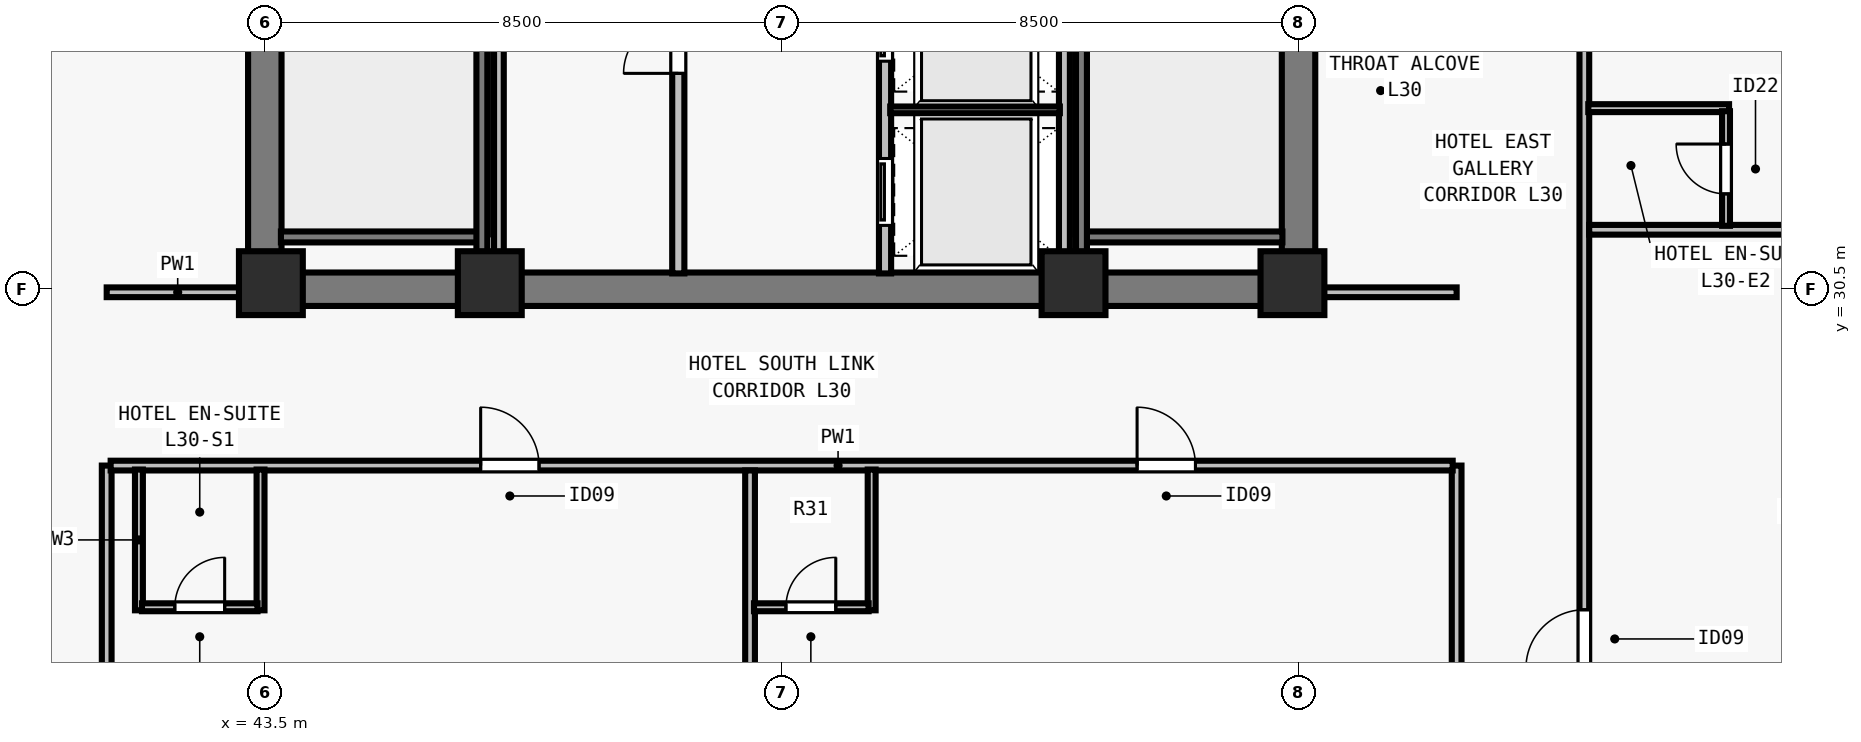
"""IFC4 building model, lengths in metres.
Left out: names, types, materials, properties, quantities, classifications, styles, units other than length and angle.
Written with IfcOpenShell. Run it as: python <this file> out.ifc"""

import sys

from ifc_helpers import new_model, si_unit, direction, frame, frame_2d, origin, origin_2d, place, context, subcontext, project, spatial, rectangle, extrude, element, fill, save


model = new_model("IFC4")
c1 = context("Model", 3, precision=1e-05, world=origin(), true_north=direction((0.0, 1.0)))
c2 = subcontext(c1, "Body", "Model", "MODEL_VIEW")
j1 = project(units=[si_unit("LENGTHUNIT", "METRE"), si_unit("PLANEANGLEUNIT", "RADIAN")], contexts=[c1])
p1 = place(None, origin())
s1 = spatial("IfcSite", under=j1, at=p1, CompositionType="ELEMENT")
p2 = place(p1, origin())
s2 = spatial("IfcBuilding", under=s1, at=p2, CompositionType="ELEMENT")
p3 = place(p2, frame((0.0, 0.0, 113.0)))
s3 = spatial("IfcBuildingStorey", under=s2, at=p3, CompositionType="ELEMENT", Elevation=113.0)
for number, where, z_axis, x_axis in (
    (1, (43.6, 30.6, 0.0), (0.0, 0.0, 1.0), (1.0, 0.0, 0.0)),
    (2, (47.2, 30.6, 0.0), (0.0, 0.0, 1.0), (1.0, 0.0, 0.0)),
    (3, (56.8, 30.6, 0.0), (0.0, 0.0, 1.0), (1.0, 0.0, 0.0)),
    (4, (60.4, 30.6, 0.0), (0.0, 0.0, 1.0), (1.0, 0.0, 0.0)),
):
    element("IfcColumn", number, at=place(p3, frame(where, z_axis=z_axis, x_axis=x_axis)), inside=s3, PredefinedType="COLUMN", context=c2, shape_type="SweptSolid", body=[
        extrude(rectangle(XDim=1.05, YDim=1.05, at=origin_2d()), origin(), (0.0, 0.0, 1.0), 3.5),
    ])
p4 = place(p3, frame((43.225, 30.5, 0.0), z_axis=(0.0, 0.0, 1.0), x_axis=(1.0, 0.0, 0.0)))
e5 = element("IfcWall", 5, at=p4, inside=s3, PredefinedType="SHEAR", context=c2, shape_type="SweptSolid", body=[
    extrude(rectangle(XDim=17.55, YDim=0.55, at=frame_2d((8.775, 0.0))), origin(), (0.0, 0.0, 1.0), 3.28),
])
for number, where, z_axis, x_axis in (
    (6, (43.5, 30.765, 0.0), (0.0, 0.0, 1.0), (0.0, 1.0, 0.0)),
    (7, (60.5, 30.765, 0.0), (0.0, 0.0, 1.0), (0.0, 1.0, 0.0)),
):
    element("IfcWall", number, at=place(p3, frame(where, z_axis=z_axis, x_axis=x_axis)), inside=s3, PredefinedType="SHEAR", context=c2, shape_type="SweptSolid", body=[
        extrude(rectangle(XDim=7.985, YDim=0.55, at=frame_2d((3.993, 0.0))), origin(), (0.0, 0.0, 1.0), 3.28),
    ])
p5 = place(p3, frame((50.3, 30.76, 0.0), z_axis=(0.0, 0.0, 1.0), x_axis=(0.0, 1.0, 0.0)))
e8 = element("IfcWall", 8, at=p5, inside=s3, PredefinedType="SOLIDWALL", context=c2, shape_type="SweptSolid", body=[
    extrude(rectangle(XDim=7.855, YDim=0.2, at=frame_2d((3.927, 0.0))), origin(), (0.0, 0.0, 1.0), 3.28),
])
p6 = place(p5, frame((3.29, 0.0, 0.0)))
e9 = element("IfcOpeningElement", 9, at=p6, cuts=e8, PredefinedType="OPENING", context=c2, shape_type="SweptSolid", body=[
    extrude(rectangle(XDim=0.9, YDim=2.12, at=frame_2d((0.45, 1.06))), frame((0.0, 0.11, 0.0), z_axis=(0.0, -1.0, 0.0), x_axis=(1.0, 0.0, 0.0)), (0.0, 0.0, 1.0), 0.22),
])
p7 = place(p3, frame((53.7, 30.76, 0.0), z_axis=(0.0, 0.0, 1.0), x_axis=(0.0, 1.0, 0.0)))
e10 = element("IfcWall", 10, at=p7, inside=s3, PredefinedType="SOLIDWALL", context=c2, shape_type="SweptSolid", body=[
    extrude(rectangle(XDim=7.855, YDim=0.2, at=frame_2d((3.927, 0.0))), origin(), (0.0, 0.0, 1.0), 3.28),
])
p8 = place(p7, frame((0.79, 0.0, 0.0)))
e11 = element("IfcOpeningElement", 11, at=p8, cuts=e10, PredefinedType="OPENING", context=c2, shape_type="SweptSolid", body=[
    extrude(rectangle(XDim=1.1, YDim=2.2, at=frame_2d((0.55, 1.1))), frame((0.0, 0.11, 0.0), z_axis=(0.0, -1.0, 0.0), x_axis=(1.0, 0.0, 0.0)), (0.0, 0.0, 1.0), 0.22),
])
p9 = place(p7, frame((3.49, 0.0, 0.0)))
e12 = element("IfcOpeningElement", 12, at=p9, cuts=e10, PredefinedType="OPENING", context=c2, shape_type="SweptSolid", body=[
    extrude(rectangle(XDim=1.1, YDim=2.2, at=frame_2d((0.55, 1.1))), frame((0.0, 0.11, 0.0), z_axis=(0.0, -1.0, 0.0), x_axis=(1.0, 0.0, 0.0)), (0.0, 0.0, 1.0), 0.22),
])
p10 = place(p7, frame((6.19, 0.0, 0.0)))
e13 = element("IfcOpeningElement", 13, at=p10, cuts=e10, PredefinedType="OPENING", context=c2, shape_type="SweptSolid", body=[
    extrude(rectangle(XDim=1.1, YDim=2.2, at=frame_2d((0.55, 1.1))), frame((0.0, 0.11, 0.0), z_axis=(0.0, -1.0, 0.0), x_axis=(1.0, 0.0, 0.0)), (0.0, 0.0, 1.0), 0.22),
])
p11 = place(p3, frame((47.35, 30.76, 0.0), z_axis=(0.0, 0.0, 1.0), x_axis=(0.0, 1.0, 0.0)))
e14 = element("IfcWall", 14, at=p11, inside=s3, PredefinedType="PARTITIONING", context=c2, shape_type="SweptSolid", body=[
    extrude(rectangle(XDim=7.855, YDim=0.16, at=frame_2d((3.927, 0.0))), origin(), (0.0, 0.0, 1.0), 3.28),
])
p12 = place(p3, frame((56.65, 30.76, 0.0), z_axis=(0.0, 0.0, 1.0), x_axis=(0.0, 1.0, 0.0)))
e15 = element("IfcWall", 15, at=p12, inside=s3, PredefinedType="SOLIDWALL", context=c2, shape_type="SweptSolid", body=[
    extrude(rectangle(XDim=7.855, YDim=0.18, at=frame_2d((3.927, 0.0))), origin(), (0.0, 0.0, 1.0), 3.28),
])
p13 = place(p3, frame((53.785, 33.45, 0.0), z_axis=(0.0, 0.0, 1.0), x_axis=(1.0, 0.0, 0.0)))
e16 = element("IfcWall", 16, at=p13, inside=s3, PredefinedType="PARTITIONING", context=c2, shape_type="SweptSolid", body=[
    extrude(rectangle(XDim=2.79, YDim=0.11, at=frame_2d((1.395, 0.0))), origin(), (0.0, 0.0, 1.0), 3.28),
])
p14 = place(p3, frame((40.9, 15.325, 0.0), z_axis=(0.0, 0.0, 1.0), x_axis=(0.0, 1.0, 0.0)))
e17 = element("IfcWall", 17, at=p14, inside=s3, PredefinedType="PARTITIONING", context=c2, shape_type="SweptSolid", body=[
    extrude(rectangle(XDim=12.275, YDim=0.16, at=frame_2d((6.138, 0.0))), origin(), (0.0, 0.0, 1.0), 2.555),
])
p15 = place(p3, frame((40.9, 30.45, 0.0), z_axis=(0.0, 0.0, 1.0), x_axis=(1.0, 0.0, 0.0)))
e18 = element("IfcWall", 18, at=p15, inside=s3, PredefinedType="PARTITIONING", context=c2, shape_type="SweptSolid", body=[
    extrude(rectangle(XDim=2.335, YDim=0.16, at=frame_2d((1.167, 0.0))), origin(), (0.0, 0.0, 1.0), 3.28),
])
p16 = place(p3, frame((65.2, 15.325, 0.0), z_axis=(0.0, 0.0, 1.0), x_axis=(0.0, 1.0, 0.0)))
e19 = element("IfcWall", 19, at=p16, inside=s3, PredefinedType="PARTITIONING", context=c2, shape_type="SweptSolid", body=[
    extrude(rectangle(XDim=47.35, YDim=0.16, at=frame_2d((23.675, 0.0))), origin(), (0.0, 0.0, 1.0), 2.555),
])
p17 = place(p16, frame((8.944, 0.0, 0.0)))
e20 = element("IfcOpeningElement", 20, at=p17, cuts=e19, PredefinedType="OPENING", context=c2, shape_type="SweptSolid", body=[
    extrude(rectangle(XDim=0.96, YDim=2.15, at=frame_2d((0.48, 1.075))), frame((0.0, 0.09, 0.0), z_axis=(0.0, -1.0, 0.0), x_axis=(1.0, 0.0, 0.0)), (0.0, 0.0, 1.0), 0.18),
])
p18 = place(p16, frame((24.322, 0.0, 0.0)))
e21 = element("IfcOpeningElement", 21, at=p18, cuts=e19, PredefinedType="OPENING", context=c2, shape_type="SweptSolid", body=[
    extrude(rectangle(XDim=0.96, YDim=2.15, at=frame_2d((0.48, 1.075))), frame((0.0, 0.09, 0.0), z_axis=(0.0, -1.0, 0.0), x_axis=(1.0, 0.0, 0.0)), (0.0, 0.0, 1.0), 0.18),
])
p19 = place(p16, frame((39.873, 0.0, 0.0)))
e22 = element("IfcOpeningElement", 22, at=p19, cuts=e19, PredefinedType="OPENING", context=c2, shape_type="SweptSolid", body=[
    extrude(rectangle(XDim=0.96, YDim=2.15, at=frame_2d((0.48, 1.075))), frame((0.0, 0.09, 0.0), z_axis=(0.0, -1.0, 0.0), x_axis=(1.0, 0.0, 0.0)), (0.0, 0.0, 1.0), 0.18),
])
p20 = place(p3, frame((63.1, 15.325, 0.0), z_axis=(0.0, 0.0, 1.0), x_axis=(0.0, 1.0, 0.0)))
e23 = element("IfcWall", 23, at=p20, inside=s3, PredefinedType="PARTITIONING", context=c2, shape_type="SweptSolid", body=[
    extrude(rectangle(XDim=12.275, YDim=0.16, at=frame_2d((6.138, 0.0))), origin(), (0.0, 0.0, 1.0), 2.555),
])
p21 = place(p3, frame((60.765, 30.45, 0.0), z_axis=(0.0, 0.0, 1.0), x_axis=(1.0, 0.0, 0.0)))
e24 = element("IfcWall", 24, at=p21, inside=s3, PredefinedType="PARTITIONING", context=c2, shape_type="SweptSolid", body=[
    extrude(rectangle(XDim=2.335, YDim=0.16, at=frame_2d((1.167, 0.0))), origin(), (0.0, 0.0, 1.0), 3.28),
])
p22 = place(p3, frame((40.965, 27.6, 0.0), z_axis=(0.0, 0.0, 1.0), x_axis=(1.0, 0.0, 0.0)))
e25 = element("IfcWall", 25, at=p22, inside=s3, PredefinedType="PARTITIONING", context=c2, shape_type="SweptSolid", body=[
    extrude(rectangle(XDim=22.07, YDim=0.16, at=frame_2d((11.035, 0.0))), origin(), (0.0, 0.0, 1.0), 3.28),
])
p23 = place(p22, frame((6.085, 0.0, 0.0)))
e26 = element("IfcOpeningElement", 26, at=p23, cuts=e25, PredefinedType="OPENING", context=c2, shape_type="SweptSolid", body=[
    extrude(rectangle(XDim=0.96, YDim=2.15, at=frame_2d((0.48, 1.075))), frame((0.0, 0.09, 0.0), z_axis=(0.0, -1.0, 0.0), x_axis=(1.0, 0.0, 0.0)), (0.0, 0.0, 1.0), 0.18),
])
p24 = place(p22, frame((16.88, 0.0, 0.0)))
e27 = element("IfcOpeningElement", 27, at=p24, cuts=e25, PredefinedType="OPENING", context=c2, shape_type="SweptSolid", body=[
    extrude(rectangle(XDim=0.96, YDim=2.15, at=frame_2d((0.48, 1.075))), frame((0.0, 0.09, 0.0), z_axis=(0.0, -1.0, 0.0), x_axis=(1.0, 0.0, 0.0)), (0.0, 0.0, 1.0), 0.18),
])
for number, where, z_axis, x_axis in (
    (28, (41.43, 25.22, 0.0), (0.0, 0.0, 1.0), (0.0, 1.0, 0.0)),
    (29, (43.43, 25.22, 0.0), (0.0, 0.0, 1.0), (0.0, 1.0, 0.0)),
):
    element("IfcWall", number, at=place(p3, frame(where, z_axis=z_axis, x_axis=x_axis)), inside=s3, PredefinedType="PLUMBINGWALL", context=c2, shape_type="SweptSolid", body=[
        extrude(rectangle(XDim=2.315, YDim=0.13, at=frame_2d((1.157, 0.0))), origin(), (0.0, 0.0, 1.0), 3.28),
    ])
p25 = place(p3, frame((41.48, 25.27, 0.0), z_axis=(0.0, 0.0, 1.0), x_axis=(1.0, 0.0, 0.0)))
e30 = element("IfcWall", 30, at=p25, inside=s3, PredefinedType="PLUMBINGWALL", context=c2, shape_type="SweptSolid", body=[
    extrude(rectangle(XDim=1.9, YDim=0.13, at=frame_2d((0.95, 0.0))), origin(), (0.0, 0.0, 1.0), 3.28),
])
p26 = place(p25, frame((0.54, 0.0, 0.0)))
e31 = element("IfcOpeningElement", 31, at=p26, cuts=e30, PredefinedType="OPENING", context=c2, shape_type="SweptSolid", body=[
    extrude(rectangle(XDim=0.82, YDim=2.1, at=frame_2d((0.41, 1.05))), frame((0.0, 0.075, 0.0), z_axis=(0.0, -1.0, 0.0), x_axis=(1.0, 0.0, 0.0)), (0.0, 0.0, 1.0), 0.15),
])
p27 = place(p3, frame((51.48, 15.325, 0.0), z_axis=(0.0, 0.0, 1.0), x_axis=(0.0, 1.0, 0.0)))
e32 = element("IfcWall", 32, at=p27, inside=s3, PredefinedType="PARTITIONING", context=c2, shape_type="SweptSolid", body=[
    extrude(rectangle(XDim=12.195, YDim=0.16, at=frame_2d((6.098, 0.0))), origin(), (0.0, 0.0, 1.0), 2.896),
])
p28 = place(p3, frame((53.48, 25.22, 0.0), z_axis=(0.0, 0.0, 1.0), x_axis=(0.0, 1.0, 0.0)))
e33 = element("IfcWall", 33, at=p28, inside=s3, PredefinedType="PLUMBINGWALL", context=c2, shape_type="SweptSolid", body=[
    extrude(rectangle(XDim=2.315, YDim=0.13, at=frame_2d((1.157, 0.0))), origin(), (0.0, 0.0, 1.0), 2.896),
])
p29 = place(p3, frame((51.545, 25.27, 0.0), z_axis=(0.0, 0.0, 1.0), x_axis=(1.0, 0.0, 0.0)))
e34 = element("IfcWall", 34, at=p29, inside=s3, PredefinedType="PLUMBINGWALL", context=c2, shape_type="SweptSolid", body=[
    extrude(rectangle(XDim=1.885, YDim=0.13, at=frame_2d((0.942, 0.0))), origin(), (0.0, 0.0, 1.0), 3.28),
])
p30 = place(p29, frame((0.525, 0.0, 0.0)))
e35 = element("IfcOpeningElement", 35, at=p30, cuts=e34, PredefinedType="OPENING", context=c2, shape_type="SweptSolid", body=[
    extrude(rectangle(XDim=0.82, YDim=2.1, at=frame_2d((0.41, 1.05))), frame((0.0, 0.075, 0.0), z_axis=(0.0, -1.0, 0.0), x_axis=(1.0, 0.0, 0.0)), (0.0, 0.0, 1.0), 0.15),
])
p31 = place(p3, frame((65.28, 31.478, 0.0), z_axis=(0.0, 0.0, 1.0), x_axis=(1.0, 0.0, 0.0)))
e36 = element("IfcWall", 36, at=p31, inside=s3, PredefinedType="PARTITIONING", context=c2, shape_type="SweptSolid", body=[
    extrude(rectangle(XDim=10.395, YDim=0.16, at=frame_2d((5.198, 0.0))), origin(), (0.0, 0.0, 1.0), 3.28),
])
p32 = place(p3, frame((65.265, 33.478, 0.0), z_axis=(0.0, 0.0, 1.0), x_axis=(1.0, 0.0, 0.0)))
e37 = element("IfcWall", 37, at=p32, inside=s3, PredefinedType="PLUMBINGWALL", context=c2, shape_type="SweptSolid", body=[
    extrude(rectangle(XDim=2.315, YDim=0.13, at=frame_2d((1.158, 0.0))), origin(), (0.0, 0.0, 1.0), 3.28),
])
p33 = place(p3, frame((67.53, 31.543, 0.0), z_axis=(0.0, 0.0, 1.0), x_axis=(0.0, 1.0, 0.0)))
e38 = element("IfcWall", 38, at=p33, inside=s3, PredefinedType="PLUMBINGWALL", context=c2, shape_type="SweptSolid", body=[
    extrude(rectangle(XDim=1.885, YDim=0.13, at=frame_2d((0.942, 0.0))), origin(), (0.0, 0.0, 1.0), 3.28),
])
p34 = place(p33, frame((0.525, 0.0, 0.0)))
e39 = element("IfcOpeningElement", 39, at=p34, cuts=e38, PredefinedType="OPENING", context=c2, shape_type="SweptSolid", body=[
    extrude(rectangle(XDim=0.82, YDim=2.1, at=frame_2d((0.41, 1.05))), frame((0.0, 0.075, 0.0), z_axis=(0.0, -1.0, 0.0), x_axis=(1.0, 0.0, 0.0)), (0.0, 0.0, 1.0), 0.15),
])
p35 = place(p3, frame((43.765, 31.36, 0.0), z_axis=(0.0, 0.0, 1.0), x_axis=(1.0, 0.0, 0.0)))
e40 = element("IfcWall", 40, at=p35, inside=s3, PredefinedType="SOLIDWALL", context=c2, shape_type="SweptSolid", body=[
    extrude(rectangle(XDim=3.23, YDim=0.18, at=frame_2d((1.615, 0.0))), origin(), (0.0, 0.0, 1.0), 3.28),
])
p36 = place(p3, frame((47.07, 38.78, 0.0), z_axis=(0.0, 0.0, 1.0), x_axis=(0.0, -1.0, 0.0)))
e41 = element("IfcWall", 41, at=p36, inside=s3, PredefinedType="SOLIDWALL", context=c2, shape_type="SweptSolid", body=[
    extrude(rectangle(XDim=8.017, YDim=0.18, at=frame_2d((4.009, 0.0))), origin(), (0.0, 0.0, 1.0), 3.28),
])
p37 = place(p3, frame((57.005, 31.36, 0.0), z_axis=(0.0, 0.0, 1.0), x_axis=(1.0, 0.0, 0.0)))
e42 = element("IfcWall", 42, at=p37, inside=s3, PredefinedType="SOLIDWALL", context=c2, shape_type="SweptSolid", body=[
    extrude(rectangle(XDim=3.23, YDim=0.18, at=frame_2d((1.615, 0.0))), origin(), (0.0, 0.0, 1.0), 3.28),
])
p38 = place(p3, frame((56.93, 38.78, 0.0), z_axis=(0.0, 0.0, 1.0), x_axis=(0.0, -1.0, 0.0)))
e43 = element("IfcWall", 43, at=p38, inside=s3, PredefinedType="SOLIDWALL", context=c2, shape_type="SweptSolid", body=[
    extrude(rectangle(XDim=8.017, YDim=0.18, at=frame_2d((4.009, 0.0))), origin(), (0.0, 0.0, 1.0), 3.28),
])
p39 = place(p6, origin())
e44 = element("IfcDoor", 44, at=p39, inside=s3, OperationType="SINGLE_SWING_LEFT", PredefinedType="DOOR", context=c2, shape_type="SweptSolid", body=[
    extrude(rectangle(XDim=0.9, YDim=2.12, at=frame_2d((0.45, 1.06))), frame((0.0, 0.025, 0.0), z_axis=(0.0, -1.0, 0.0), x_axis=(1.0, 0.0, 0.0)), (0.0, 0.0, 1.0), 0.05),
])
fill(e9, e44)
p40 = place(p8, origin())
e45 = element("IfcDoor", 45, at=p40, inside=s3, OperationType="SLIDING_TO_LEFT", PredefinedType="DOOR", context=c2, shape_type="SweptSolid", body=[
    extrude(rectangle(XDim=1.1, YDim=2.2, at=frame_2d((0.55, 1.1))), frame((0.0, 0.025, 0.0), z_axis=(0.0, -1.0, 0.0), x_axis=(1.0, 0.0, 0.0)), (0.0, 0.0, 1.0), 0.05),
])
fill(e11, e45)
p41 = place(p9, origin())
e46 = element("IfcDoor", 46, at=p41, inside=s3, OperationType="SLIDING_TO_LEFT", PredefinedType="DOOR", context=c2, shape_type="SweptSolid", body=[
    extrude(rectangle(XDim=1.1, YDim=2.2, at=frame_2d((0.55, 1.1))), frame((0.0, 0.025, 0.0), z_axis=(0.0, -1.0, 0.0), x_axis=(1.0, 0.0, 0.0)), (0.0, 0.0, 1.0), 0.05),
])
fill(e12, e46)
p42 = place(p26, origin())
e47 = element("IfcDoor", 47, at=p42, inside=s3, OperationType="SINGLE_SWING_RIGHT", PredefinedType="DOOR", context=c2, shape_type="SweptSolid", body=[
    extrude(rectangle(XDim=0.82, YDim=2.1, at=frame_2d((0.41, 1.05))), frame((0.0, 0.025, 0.0), z_axis=(0.0, -1.0, 0.0), x_axis=(1.0, 0.0, 0.0)), (0.0, 0.0, 1.0), 0.05),
])
fill(e31, e47)
p43 = place(p23, origin())
e48 = element("IfcDoor", 48, at=p43, inside=s3, OperationType="SINGLE_SWING_LEFT", PredefinedType="DOOR", context=c2, shape_type="SweptSolid", body=[
    extrude(rectangle(XDim=0.96, YDim=2.15, at=frame_2d((0.48, 1.075))), frame((0.0, 0.025, 0.0), z_axis=(0.0, -1.0, 0.0), x_axis=(1.0, 0.0, 0.0)), (0.0, 0.0, 1.0), 0.05),
])
fill(e26, e48)
p44 = place(p30, origin())
e49 = element("IfcDoor", 49, at=p44, inside=s3, OperationType="SINGLE_SWING_RIGHT", PredefinedType="DOOR", context=c2, shape_type="SweptSolid", body=[
    extrude(rectangle(XDim=0.82, YDim=2.1, at=frame_2d((0.41, 1.05))), frame((0.0, 0.025, 0.0), z_axis=(0.0, -1.0, 0.0), x_axis=(1.0, 0.0, 0.0)), (0.0, 0.0, 1.0), 0.05),
])
fill(e35, e49)
p45 = place(p24, origin())
e50 = element("IfcDoor", 50, at=p45, inside=s3, OperationType="SINGLE_SWING_LEFT", PredefinedType="DOOR", context=c2, shape_type="SweptSolid", body=[
    extrude(rectangle(XDim=0.96, YDim=2.15, at=frame_2d((0.48, 1.075))), frame((0.0, 0.025, 0.0), z_axis=(0.0, -1.0, 0.0), x_axis=(1.0, 0.0, 0.0)), (0.0, 0.0, 1.0), 0.05),
])
fill(e27, e50)
p46 = place(p17, origin())
e51 = element("IfcDoor", 51, at=p46, inside=s3, OperationType="SINGLE_SWING_LEFT", PredefinedType="DOOR", context=c2, shape_type="SweptSolid", body=[
    extrude(rectangle(XDim=0.96, YDim=2.15, at=frame_2d((0.48, 1.075))), frame((0.0, 0.025, 0.0), z_axis=(0.0, -1.0, 0.0), x_axis=(1.0, 0.0, 0.0)), (0.0, 0.0, 1.0), 0.05),
])
fill(e20, e51)
p47 = place(p34, origin())
e52 = element("IfcDoor", 52, at=p47, inside=s3, OperationType="SINGLE_SWING_RIGHT", PredefinedType="DOOR", context=c2, shape_type="SweptSolid", body=[
    extrude(rectangle(XDim=0.82, YDim=2.1, at=frame_2d((0.41, 1.05))), frame((0.0, 0.025, 0.0), z_axis=(0.0, -1.0, 0.0), x_axis=(1.0, 0.0, 0.0)), (0.0, 0.0, 1.0), 0.05),
])
fill(e39, e52)
save(model, sys.argv[1])
